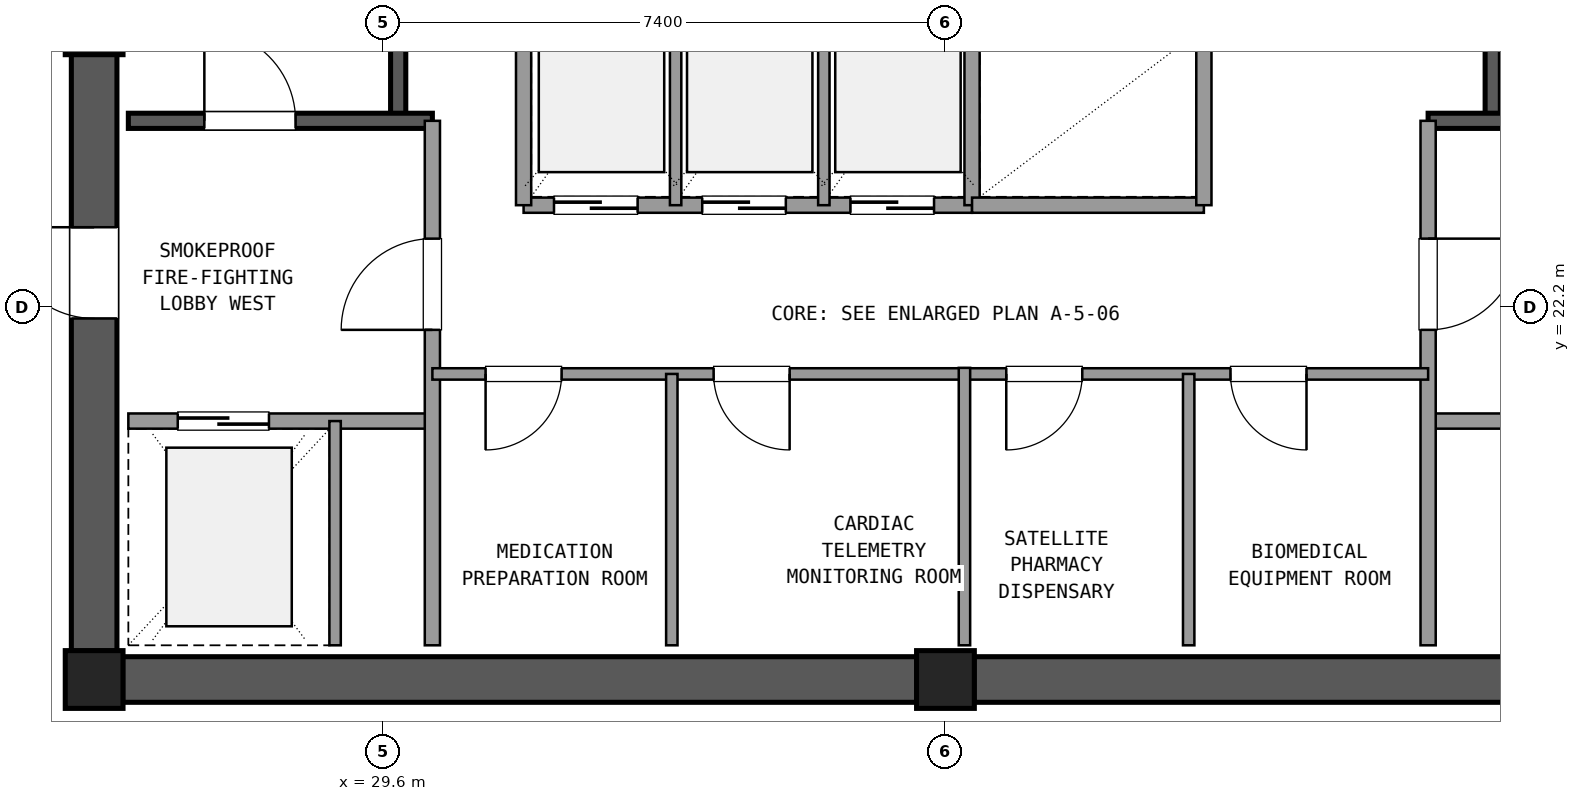
"""IFC4 building model, lengths in metres.
Left out: names, types, materials, properties, quantities, classifications, styles, units other than length and angle.
Written with IfcOpenShell. Run it as: python <this file> out.ifc"""

import sys

from ifc_helpers import new_model, si_unit, direction, frame, frame_2d, origin, origin_2d, place, context, subcontext, project, spatial, rectangle, extrude, element, fill, save


model = new_model("IFC4")
c1 = context("Model", 3, precision=1e-05, world=origin(), true_north=direction((0.0, 1.0)))
c2 = subcontext(c1, "Body", "Model", "MODEL_VIEW")
j1 = project(units=[si_unit("LENGTHUNIT", "METRE"), si_unit("PLANEANGLEUNIT", "RADIAN")], contexts=[c1])
p1 = place(None, origin())
s1 = spatial("IfcSite", under=j1, at=p1, CompositionType="ELEMENT")
p2 = place(p1, origin())
s2 = spatial("IfcBuilding", under=s1, at=p2, CompositionType="ELEMENT")
p3 = place(p2, frame((0.0, 0.0, 294.66)))
s3 = spatial("IfcBuildingStorey", under=s2, at=p3, CompositionType="ELEMENT", Elevation=294.66)
for number, where, z_axis, x_axis in (
    (1, (25.8, 17.3, 0.0), (0.0, 0.0, 1.0), (1.0, 0.0, 0.0)),
    (2, (37.0, 17.3, 0.0), (0.0, 0.0, 1.0), (1.0, 0.0, 0.0)),
    (3, (25.8, 25.9, 0.0), (0.0, 0.0, 1.0), (1.0, 0.0, 0.0)),
):
    element("IfcColumn", number, at=place(p3, frame(where, z_axis=z_axis, x_axis=x_axis)), inside=s3, PredefinedType="COLUMN", context=c2, shape_type="SweptSolid", body=[
        extrude(rectangle(XDim=0.76, YDim=0.76, at=origin_2d()), origin(), (0.0, 0.0, 1.0), 4.32),
    ])
for number, where, z_axis, x_axis in (
    (4, (26.175, 17.3, 0.0), (0.0, 0.0, 1.0), (1.0, 0.0, 0.0)),
    (5, (37.375, 17.3, 0.0), (0.0, 0.0, 1.0), (1.0, 0.0, 0.0)),
):
    element("IfcWall", number, at=place(p3, frame(where, z_axis=z_axis, x_axis=x_axis)), inside=s3, PredefinedType="SHEAR", context=c2, shape_type="SweptSolid", body=[
        extrude(rectangle(XDim=10.45, YDim=0.6, at=frame_2d((5.225, 0.0))), origin(), (0.0, 0.0, 1.0), 4.02),
    ])
p4 = place(p3, frame((25.8, 25.525, 0.0), z_axis=(0.0, 0.0, 1.0), x_axis=(0.0, -1.0, 0.0)))
e6 = element("IfcWall", 6, at=p4, inside=s3, PredefinedType="SHEAR", context=c2, shape_type="SweptSolid", body=[
    extrude(rectangle(XDim=7.85, YDim=0.6, at=frame_2d((3.925, 0.0))), origin(), (0.0, 0.0, 1.0), 4.02),
])
p5 = place(p4, frame((2.275, 0.0, 0.0)))
e7 = element("IfcOpeningElement", 7, at=p5, cuts=e6, PredefinedType="OPENING", context=c2, shape_type="SweptSolid", body=[
    extrude(rectangle(XDim=1.2, YDim=2.15, at=frame_2d((0.6, 1.075))), frame((0.0, 0.31, 0.0), z_axis=(0.0, -1.0, 0.0), x_axis=(1.0, 0.0, 0.0)), (0.0, 0.0, 1.0), 0.62),
])
p6 = place(p3, frame((29.8, 24.65, 0.0), z_axis=(0.0, 0.0, 1.0), x_axis=(0.0, 1.0, 0.0)))
e8 = element("IfcWall", 8, at=p6, inside=s3, PredefinedType="SHEAR", context=c2, shape_type="SweptSolid", body=[
    extrude(rectangle(XDim=9.4, YDim=0.2, at=frame_2d((4.7, 0.0))), origin(), (0.0, 0.0, 1.0), 4.02),
])
p7 = place(p3, frame((26.25, 24.65, 0.0), z_axis=(0.0, 0.0, 1.0), x_axis=(1.0, 0.0, 0.0)))
e9 = element("IfcWall", 9, at=p7, inside=s3, PredefinedType="SHEAR", context=c2, shape_type="SweptSolid", body=[
    extrude(rectangle(XDim=4.0, YDim=0.2, at=frame_2d((2.0, 0.0))), origin(), (0.0, 0.0, 1.0), 4.02),
])
p8 = place(p7, frame((1.0, 0.0, 0.0)))
e10 = element("IfcOpeningElement", 10, at=p8, cuts=e9, PredefinedType="OPENING", context=c2, shape_type="SweptSolid", body=[
    extrude(rectangle(XDim=1.2, YDim=2.15, at=frame_2d((0.6, 1.075))), frame((0.0, 0.11, 0.0), z_axis=(0.0, -1.0, 0.0), x_axis=(1.0, 0.0, 0.0)), (0.0, 0.0, 1.0), 0.22),
])
p9 = place(p3, frame((44.2, 24.65, 0.0), z_axis=(0.0, 0.0, 1.0), x_axis=(0.0, 1.0, 0.0)))
e11 = element("IfcWall", 11, at=p9, inside=s3, PredefinedType="SHEAR", context=c2, shape_type="SweptSolid", body=[
    extrude(rectangle(XDim=9.4, YDim=0.2, at=frame_2d((4.7, 0.0))), origin(), (0.0, 0.0, 1.0), 4.02),
])
p10 = place(p3, frame((43.35, 24.65, 0.0), z_axis=(0.0, 0.0, 1.0), x_axis=(1.0, 0.0, 0.0)))
e12 = element("IfcWall", 12, at=p10, inside=s3, PredefinedType="SHEAR", context=c2, shape_type="SweptSolid", body=[
    extrude(rectangle(XDim=4.4, YDim=0.2, at=frame_2d((2.2, 0.0))), origin(), (0.0, 0.0, 1.0), 4.02),
])
p11 = place(p10, frame((2.0, 0.0, 0.0)))
e13 = element("IfcOpeningElement", 13, at=p11, cuts=e12, PredefinedType="OPENING", context=c2, shape_type="SweptSolid", body=[
    extrude(rectangle(XDim=1.2, YDim=2.15, at=frame_2d((0.6, 1.075))), frame((0.0, 0.11, 0.0), z_axis=(0.0, -1.0, 0.0), x_axis=(1.0, 0.0, 0.0)), (0.0, 0.0, 1.0), 0.22),
])
p12 = place(p3, frame((26.25, 20.7, 0.0), z_axis=(0.0, 0.0, 1.0), x_axis=(1.0, 0.0, 0.0)))
e14 = element("IfcWall", 14, at=p12, inside=s3, PredefinedType="SOLIDWALL", context=c2, shape_type="SweptSolid", body=[
    extrude(rectangle(XDim=4.0, YDim=0.2, at=frame_2d((2.0, 0.0))), origin(), (0.0, 0.0, 1.0), 3.31),
])
p13 = place(p12, frame((0.65, 0.0, 0.0)))
e15 = element("IfcOpeningElement", 15, at=p13, cuts=e14, PredefinedType="OPENING", context=c2, shape_type="SweptSolid", body=[
    extrude(rectangle(XDim=1.2, YDim=2.15, at=frame_2d((0.6, 1.075))), frame((0.0, 0.11, 0.0), z_axis=(0.0, -1.0, 0.0), x_axis=(1.0, 0.0, 0.0)), (0.0, 0.0, 1.0), 0.22),
])
p14 = place(p3, frame((30.25, 17.75, 0.0), z_axis=(0.0, 0.0, 1.0), x_axis=(0.0, 1.0, 0.0)))
e16 = element("IfcWall", 16, at=p14, inside=s3, PredefinedType="SOLIDWALL", context=c2, shape_type="SweptSolid", body=[
    extrude(rectangle(XDim=6.9, YDim=0.2, at=frame_2d((3.45, 0.0))), origin(), (0.0, 0.0, 1.0), 3.31),
])
p15 = place(p14, frame((4.15, 0.0, 0.0)))
e17 = element("IfcOpeningElement", 17, at=p15, cuts=e16, PredefinedType="OPENING", context=c2, shape_type="SweptSolid", body=[
    extrude(rectangle(XDim=1.2, YDim=2.15, at=frame_2d((0.6, 1.075))), frame((0.0, 0.11, 0.0), z_axis=(0.0, -1.0, 0.0), x_axis=(1.0, 0.0, 0.0)), (0.0, 0.0, 1.0), 0.22),
])
p16 = place(p3, frame((28.97, 17.75, 0.0), z_axis=(0.0, 0.0, 1.0), x_axis=(0.0, 1.0, 0.0)))
e18 = element("IfcWall", 18, at=p16, inside=s3, PredefinedType="PARTITIONING", context=c2, shape_type="SweptSolid", body=[
    extrude(rectangle(XDim=2.95, YDim=0.15, at=frame_2d((1.475, 0.0))), origin(), (0.0, 0.0, 1.0), 3.31),
])
p17 = place(p3, frame((43.35, 20.7, 0.0), z_axis=(0.0, 0.0, 1.0), x_axis=(1.0, 0.0, 0.0)))
e19 = element("IfcWall", 19, at=p17, inside=s3, PredefinedType="SOLIDWALL", context=c2, shape_type="SweptSolid", body=[
    extrude(rectangle(XDim=4.4, YDim=0.2, at=frame_2d((2.2, 0.0))), origin(), (0.0, 0.0, 1.0), 3.31),
])
p18 = place(p17, frame((2.35, 0.0, 0.0)))
e20 = element("IfcOpeningElement", 20, at=p18, cuts=e19, PredefinedType="OPENING", context=c2, shape_type="SweptSolid", body=[
    extrude(rectangle(XDim=1.2, YDim=2.15, at=frame_2d((0.6, 1.075))), frame((0.0, 0.11, 0.0), z_axis=(0.0, -1.0, 0.0), x_axis=(1.0, 0.0, 0.0)), (0.0, 0.0, 1.0), 0.22),
])
p19 = place(p3, frame((43.35, 17.75, 0.0), z_axis=(0.0, 0.0, 1.0), x_axis=(0.0, 1.0, 0.0)))
e21 = element("IfcWall", 21, at=p19, inside=s3, PredefinedType="SOLIDWALL", context=c2, shape_type="SweptSolid", body=[
    extrude(rectangle(XDim=6.9, YDim=0.2, at=frame_2d((3.45, 0.0))), origin(), (0.0, 0.0, 1.0), 3.31),
])
p20 = place(p19, frame((4.15, 0.0, 0.0)))
e22 = element("IfcOpeningElement", 22, at=p20, cuts=e21, PredefinedType="OPENING", context=c2, shape_type="SweptSolid", body=[
    extrude(rectangle(XDim=1.2, YDim=2.15, at=frame_2d((0.6, 1.075))), frame((0.0, 0.11, 0.0), z_axis=(0.0, -1.0, 0.0), x_axis=(1.0, 0.0, 0.0)), (0.0, 0.0, 1.0), 0.22),
])
p21 = place(p3, frame((30.25, 21.32, 0.0), z_axis=(0.0, 0.0, 1.0), x_axis=(1.0, 0.0, 0.0)))
e23 = element("IfcWall", 23, at=p21, inside=s3, PredefinedType="PARTITIONING", context=c2, shape_type="SweptSolid", body=[
    extrude(rectangle(XDim=7.0, YDim=0.15, at=frame_2d((3.5, 0.0))), origin(), (0.0, 0.0, 1.0), 3.31),
])
p22 = place(p21, frame((0.7, 0.0, 0.0)))
e24 = element("IfcOpeningElement", 24, at=p22, cuts=e23, PredefinedType="OPENING", context=c2, shape_type="SweptSolid", body=[
    extrude(rectangle(XDim=1.0, YDim=2.15, at=frame_2d((0.5, 1.075))), frame((0.0, 0.085, 0.0), z_axis=(0.0, -1.0, 0.0), x_axis=(1.0, 0.0, 0.0)), (0.0, 0.0, 1.0), 0.17),
])
p23 = place(p21, frame((3.7, 0.0, 0.0)))
e25 = element("IfcOpeningElement", 25, at=p23, cuts=e23, PredefinedType="OPENING", context=c2, shape_type="SweptSolid", body=[
    extrude(rectangle(XDim=1.0, YDim=2.15, at=frame_2d((0.5, 1.075))), frame((0.0, 0.085, 0.0), z_axis=(0.0, -1.0, 0.0), x_axis=(1.0, 0.0, 0.0)), (0.0, 0.0, 1.0), 0.17),
])
p24 = place(p3, frame((33.4, 17.75, 0.0), z_axis=(0.0, 0.0, 1.0), x_axis=(0.0, 1.0, 0.0)))
e26 = element("IfcWall", 26, at=p24, inside=s3, PredefinedType="PARTITIONING", context=c2, shape_type="SweptSolid", body=[
    extrude(rectangle(XDim=3.57, YDim=0.15, at=frame_2d((1.785, 0.0))), origin(), (0.0, 0.0, 1.0), 3.31),
])
p25 = place(p3, frame((37.25, 21.32, 0.0), z_axis=(0.0, 0.0, 1.0), x_axis=(1.0, 0.0, 0.0)))
e27 = element("IfcWall", 27, at=p25, inside=s3, PredefinedType="PARTITIONING", context=c2, shape_type="SweptSolid", body=[
    extrude(rectangle(XDim=6.1, YDim=0.15, at=frame_2d((3.05, 0.0))), origin(), (0.0, 0.0, 1.0), 3.31),
])
p26 = place(p25, frame((0.55, 0.0, 0.0)))
e28 = element("IfcOpeningElement", 28, at=p26, cuts=e27, PredefinedType="OPENING", context=c2, shape_type="SweptSolid", body=[
    extrude(rectangle(XDim=1.0, YDim=2.15, at=frame_2d((0.5, 1.075))), frame((0.0, 0.085, 0.0), z_axis=(0.0, -1.0, 0.0), x_axis=(1.0, 0.0, 0.0)), (0.0, 0.0, 1.0), 0.17),
])
p27 = place(p25, frame((3.5, 0.0, 0.0)))
e29 = element("IfcOpeningElement", 29, at=p27, cuts=e27, PredefinedType="OPENING", context=c2, shape_type="SweptSolid", body=[
    extrude(rectangle(XDim=1.0, YDim=2.15, at=frame_2d((0.5, 1.075))), frame((0.0, 0.085, 0.0), z_axis=(0.0, -1.0, 0.0), x_axis=(1.0, 0.0, 0.0)), (0.0, 0.0, 1.0), 0.17),
])
p28 = place(p3, frame((40.2, 17.75, 0.0), z_axis=(0.0, 0.0, 1.0), x_axis=(0.0, 1.0, 0.0)))
e30 = element("IfcWall", 30, at=p28, inside=s3, PredefinedType="PARTITIONING", context=c2, shape_type="SweptSolid", body=[
    extrude(rectangle(XDim=3.57, YDim=0.15, at=frame_2d((1.785, 0.0))), origin(), (0.0, 0.0, 1.0), 3.31),
])
p29 = place(p3, frame((37.25, 17.75, 0.0), z_axis=(0.0, 0.0, 1.0), x_axis=(0.0, 1.0, 0.0)))
e31 = element("IfcWall", 31, at=p29, inside=s3, PredefinedType="PARTITIONING", context=c2, shape_type="SweptSolid", body=[
    extrude(rectangle(XDim=3.65, YDim=0.15, at=frame_2d((1.825, 0.0))), origin(), (0.0, 0.0, 1.0), 3.31),
])
p30 = place(p3, frame((31.45, 23.54, 0.0), z_axis=(0.0, 0.0, 1.0), x_axis=(1.0, 0.0, 0.0)))
e32 = element("IfcWall", 32, at=p30, inside=s3, PredefinedType="SOLIDWALL", context=c2, shape_type="SweptSolid", body=[
    extrude(rectangle(XDim=5.9, YDim=0.2, at=frame_2d((2.95, 0.0))), origin(), (0.0, 0.0, 1.0), 3.31),
])
p31 = place(p30, frame((0.4, 0.0, 0.0)))
e33 = element("IfcOpeningElement", 33, at=p31, cuts=e32, PredefinedType="OPENING", context=c2, shape_type="SweptSolid", body=[
    extrude(rectangle(XDim=1.1, YDim=2.15, at=frame_2d((0.55, 1.075))), frame((0.0, 0.11, 0.0), z_axis=(0.0, -1.0, 0.0), x_axis=(1.0, 0.0, 0.0)), (0.0, 0.0, 1.0), 0.22),
])
p32 = place(p30, frame((2.35, 0.0, 0.0)))
e34 = element("IfcOpeningElement", 34, at=p32, cuts=e32, PredefinedType="OPENING", context=c2, shape_type="SweptSolid", body=[
    extrude(rectangle(XDim=1.1, YDim=2.15, at=frame_2d((0.55, 1.075))), frame((0.0, 0.11, 0.0), z_axis=(0.0, -1.0, 0.0), x_axis=(1.0, 0.0, 0.0)), (0.0, 0.0, 1.0), 0.22),
])
p33 = place(p30, frame((4.3, 0.0, 0.0)))
e35 = element("IfcOpeningElement", 35, at=p33, cuts=e32, PredefinedType="OPENING", context=c2, shape_type="SweptSolid", body=[
    extrude(rectangle(XDim=1.1, YDim=2.15, at=frame_2d((0.55, 1.075))), frame((0.0, 0.11, 0.0), z_axis=(0.0, -1.0, 0.0), x_axis=(1.0, 0.0, 0.0)), (0.0, 0.0, 1.0), 0.22),
])
p34 = place(p3, frame((31.45, 23.54, 0.0), z_axis=(0.0, 0.0, 1.0), x_axis=(0.0, 1.0, 0.0)))
e36 = element("IfcWall", 36, at=p34, inside=s3, PredefinedType="SOLIDWALL", context=c2, shape_type="SweptSolid", body=[
    extrude(rectangle(XDim=2.81, YDim=0.2, at=frame_2d((1.405, 0.0))), origin(), (0.0, 0.0, 1.0), 3.31),
])
for number, where, z_axis, x_axis in (
    (37, (33.45, 23.54, 0.0), (0.0, 0.0, 1.0), (0.0, 1.0, 0.0)),
    (38, (35.4, 23.54, 0.0), (0.0, 0.0, 1.0), (0.0, 1.0, 0.0)),
):
    element("IfcWall", number, at=place(p3, frame(where, z_axis=z_axis, x_axis=x_axis)), inside=s3, PredefinedType="PARTITIONING", context=c2, shape_type="SweptSolid", body=[
        extrude(rectangle(XDim=2.81, YDim=0.15, at=frame_2d((1.405, 0.0))), origin(), (0.0, 0.0, 1.0), 3.31),
    ])
p35 = place(p3, frame((37.35, 23.54, 0.0), z_axis=(0.0, 0.0, 1.0), x_axis=(0.0, 1.0, 0.0)))
e39 = element("IfcWall", 39, at=p35, inside=s3, PredefinedType="SOLIDWALL", context=c2, shape_type="SweptSolid", body=[
    extrude(rectangle(XDim=6.82, YDim=0.2, at=frame_2d((3.41, 0.0))), origin(), (0.0, 0.0, 1.0), 3.31),
])
p36 = place(p3, frame((37.35, 23.54, 0.0), z_axis=(0.0, 0.0, 1.0), x_axis=(1.0, 0.0, 0.0)))
e40 = element("IfcWall", 40, at=p36, inside=s3, PredefinedType="SOLIDWALL", context=c2, shape_type="SweptSolid", body=[
    extrude(rectangle(XDim=3.05, YDim=0.2, at=frame_2d((1.525, 0.0))), origin(), (0.0, 0.0, 1.0), 3.31),
])
p37 = place(p3, frame((40.4, 23.54, 0.0), z_axis=(0.0, 0.0, 1.0), x_axis=(0.0, 1.0, 0.0)))
e41 = element("IfcWall", 41, at=p37, inside=s3, PredefinedType="SOLIDWALL", context=c2, shape_type="SweptSolid", body=[
    extrude(rectangle(XDim=6.82, YDim=0.2, at=frame_2d((3.41, 0.0))), origin(), (0.0, 0.0, 1.0), 3.31),
])
p38 = place(p37, frame((4.85, 0.0, 0.0)))
e42 = element("IfcOpeningElement", 42, at=p38, cuts=e41, PredefinedType="OPENING", context=c2, shape_type="SweptSolid", body=[
    extrude(rectangle(XDim=1.4, YDim=2.2, at=frame_2d((0.7, 1.1))), frame((0.0, 0.11, 0.0), z_axis=(0.0, -1.0, 0.0), x_axis=(1.0, 0.0, 0.0)), (0.0, 0.0, 1.0), 0.22),
])
p39 = place(p8, origin())
e43 = element("IfcDoor", 43, at=p39, inside=s3, OperationType="SINGLE_SWING_LEFT", PredefinedType="DOOR", context=c2, shape_type="SweptSolid", body=[
    extrude(rectangle(XDim=1.2, YDim=2.15, at=frame_2d((0.6, 1.075))), frame((0.0, 0.025, 0.0), z_axis=(0.0, -1.0, 0.0), x_axis=(1.0, 0.0, 0.0)), (0.0, 0.0, 1.0), 0.05),
])
fill(e10, e43)
p40 = place(p13, origin())
e44 = element("IfcDoor", 44, at=p40, inside=s3, OperationType="SLIDING_TO_LEFT", PredefinedType="DOOR", context=c2, shape_type="SweptSolid", body=[
    extrude(rectangle(XDim=1.2, YDim=2.15, at=frame_2d((0.6, 1.075))), frame((0.0, 0.025, 0.0), z_axis=(0.0, -1.0, 0.0), x_axis=(1.0, 0.0, 0.0)), (0.0, 0.0, 1.0), 0.05),
])
fill(e15, e44)
p41 = place(p15, origin())
e45 = element("IfcDoor", 45, at=p41, inside=s3, OperationType="SINGLE_SWING_LEFT", PredefinedType="DOOR", context=c2, shape_type="SweptSolid", body=[
    extrude(rectangle(XDim=1.2, YDim=2.15, at=frame_2d((0.6, 1.075))), frame((0.0, 0.025, 0.0), z_axis=(0.0, -1.0, 0.0), x_axis=(1.0, 0.0, 0.0)), (0.0, 0.0, 1.0), 0.05),
])
fill(e17, e45)
p42 = place(p20, frame((1.2, 0.0, 0.0), z_axis=(0.0, 0.0, 1.0), x_axis=(-1.0, 0.0, 0.0)))
e46 = element("IfcDoor", 46, at=p42, inside=s3, OperationType="SINGLE_SWING_RIGHT", PredefinedType="DOOR", context=c2, shape_type="SweptSolid", body=[
    extrude(rectangle(XDim=1.2, YDim=2.15, at=frame_2d((0.6, 1.075))), frame((0.0, 0.025, 0.0), z_axis=(0.0, -1.0, 0.0), x_axis=(1.0, 0.0, 0.0)), (0.0, 0.0, 1.0), 0.05),
])
fill(e22, e46)
p43 = place(p5, frame((1.2, 0.0, 0.0), z_axis=(0.0, 0.0, 1.0), x_axis=(-1.0, 0.0, 0.0)))
e47 = element("IfcDoor", 47, at=p43, inside=s3, OperationType="SINGLE_SWING_LEFT", PredefinedType="DOOR", context=c2, shape_type="SweptSolid", body=[
    extrude(rectangle(XDim=1.2, YDim=2.15, at=frame_2d((0.6, 1.075))), frame((0.0, 0.025, 0.0), z_axis=(0.0, -1.0, 0.0), x_axis=(1.0, 0.0, 0.0)), (0.0, 0.0, 1.0), 0.05),
])
fill(e7, e47)
p44 = place(p22, frame((1.0, 0.0, 0.0), z_axis=(0.0, 0.0, 1.0), x_axis=(-1.0, 0.0, 0.0)))
e48 = element("IfcDoor", 48, at=p44, inside=s3, OperationType="SINGLE_SWING_LEFT", PredefinedType="DOOR", context=c2, shape_type="SweptSolid", body=[
    extrude(rectangle(XDim=1.0, YDim=2.15, at=frame_2d((0.5, 1.075))), frame((0.0, 0.025, 0.0), z_axis=(0.0, -1.0, 0.0), x_axis=(1.0, 0.0, 0.0)), (0.0, 0.0, 1.0), 0.05),
])
fill(e24, e48)
p45 = place(p23, frame((1.0, 0.0, 0.0), z_axis=(0.0, 0.0, 1.0), x_axis=(-1.0, 0.0, 0.0)))
e49 = element("IfcDoor", 49, at=p45, inside=s3, OperationType="SINGLE_SWING_RIGHT", PredefinedType="DOOR", context=c2, shape_type="SweptSolid", body=[
    extrude(rectangle(XDim=1.0, YDim=2.15, at=frame_2d((0.5, 1.075))), frame((0.0, 0.025, 0.0), z_axis=(0.0, -1.0, 0.0), x_axis=(1.0, 0.0, 0.0)), (0.0, 0.0, 1.0), 0.05),
])
fill(e25, e49)
p46 = place(p26, frame((1.0, 0.0, 0.0), z_axis=(0.0, 0.0, 1.0), x_axis=(-1.0, 0.0, 0.0)))
e50 = element("IfcDoor", 50, at=p46, inside=s3, OperationType="SINGLE_SWING_LEFT", PredefinedType="DOOR", context=c2, shape_type="SweptSolid", body=[
    extrude(rectangle(XDim=1.0, YDim=2.15, at=frame_2d((0.5, 1.075))), frame((0.0, 0.025, 0.0), z_axis=(0.0, -1.0, 0.0), x_axis=(1.0, 0.0, 0.0)), (0.0, 0.0, 1.0), 0.05),
])
fill(e28, e50)
p47 = place(p27, frame((1.0, 0.0, 0.0), z_axis=(0.0, 0.0, 1.0), x_axis=(-1.0, 0.0, 0.0)))
e51 = element("IfcDoor", 51, at=p47, inside=s3, OperationType="SINGLE_SWING_RIGHT", PredefinedType="DOOR", context=c2, shape_type="SweptSolid", body=[
    extrude(rectangle(XDim=1.0, YDim=2.15, at=frame_2d((0.5, 1.075))), frame((0.0, 0.025, 0.0), z_axis=(0.0, -1.0, 0.0), x_axis=(1.0, 0.0, 0.0)), (0.0, 0.0, 1.0), 0.05),
])
fill(e29, e51)
p48 = place(p31, origin())
e52 = element("IfcDoor", 52, at=p48, inside=s3, OperationType="SLIDING_TO_RIGHT", PredefinedType="DOOR", context=c2, shape_type="SweptSolid", body=[
    extrude(rectangle(XDim=1.1, YDim=2.15, at=frame_2d((0.55, 1.075))), frame((0.0, 0.025, 0.0), z_axis=(0.0, -1.0, 0.0), x_axis=(1.0, 0.0, 0.0)), (0.0, 0.0, 1.0), 0.05),
])
fill(e33, e52)
p49 = place(p32, origin())
e53 = element("IfcDoor", 53, at=p49, inside=s3, OperationType="SLIDING_TO_RIGHT", PredefinedType="DOOR", context=c2, shape_type="SweptSolid", body=[
    extrude(rectangle(XDim=1.1, YDim=2.15, at=frame_2d((0.55, 1.075))), frame((0.0, 0.025, 0.0), z_axis=(0.0, -1.0, 0.0), x_axis=(1.0, 0.0, 0.0)), (0.0, 0.0, 1.0), 0.05),
])
fill(e34, e53)
p50 = place(p33, origin())
e54 = element("IfcDoor", 54, at=p50, inside=s3, OperationType="SLIDING_TO_RIGHT", PredefinedType="DOOR", context=c2, shape_type="SweptSolid", body=[
    extrude(rectangle(XDim=1.1, YDim=2.15, at=frame_2d((0.55, 1.075))), frame((0.0, 0.025, 0.0), z_axis=(0.0, -1.0, 0.0), x_axis=(1.0, 0.0, 0.0)), (0.0, 0.0, 1.0), 0.05),
])
fill(e35, e54)
save(model, sys.argv[1])
